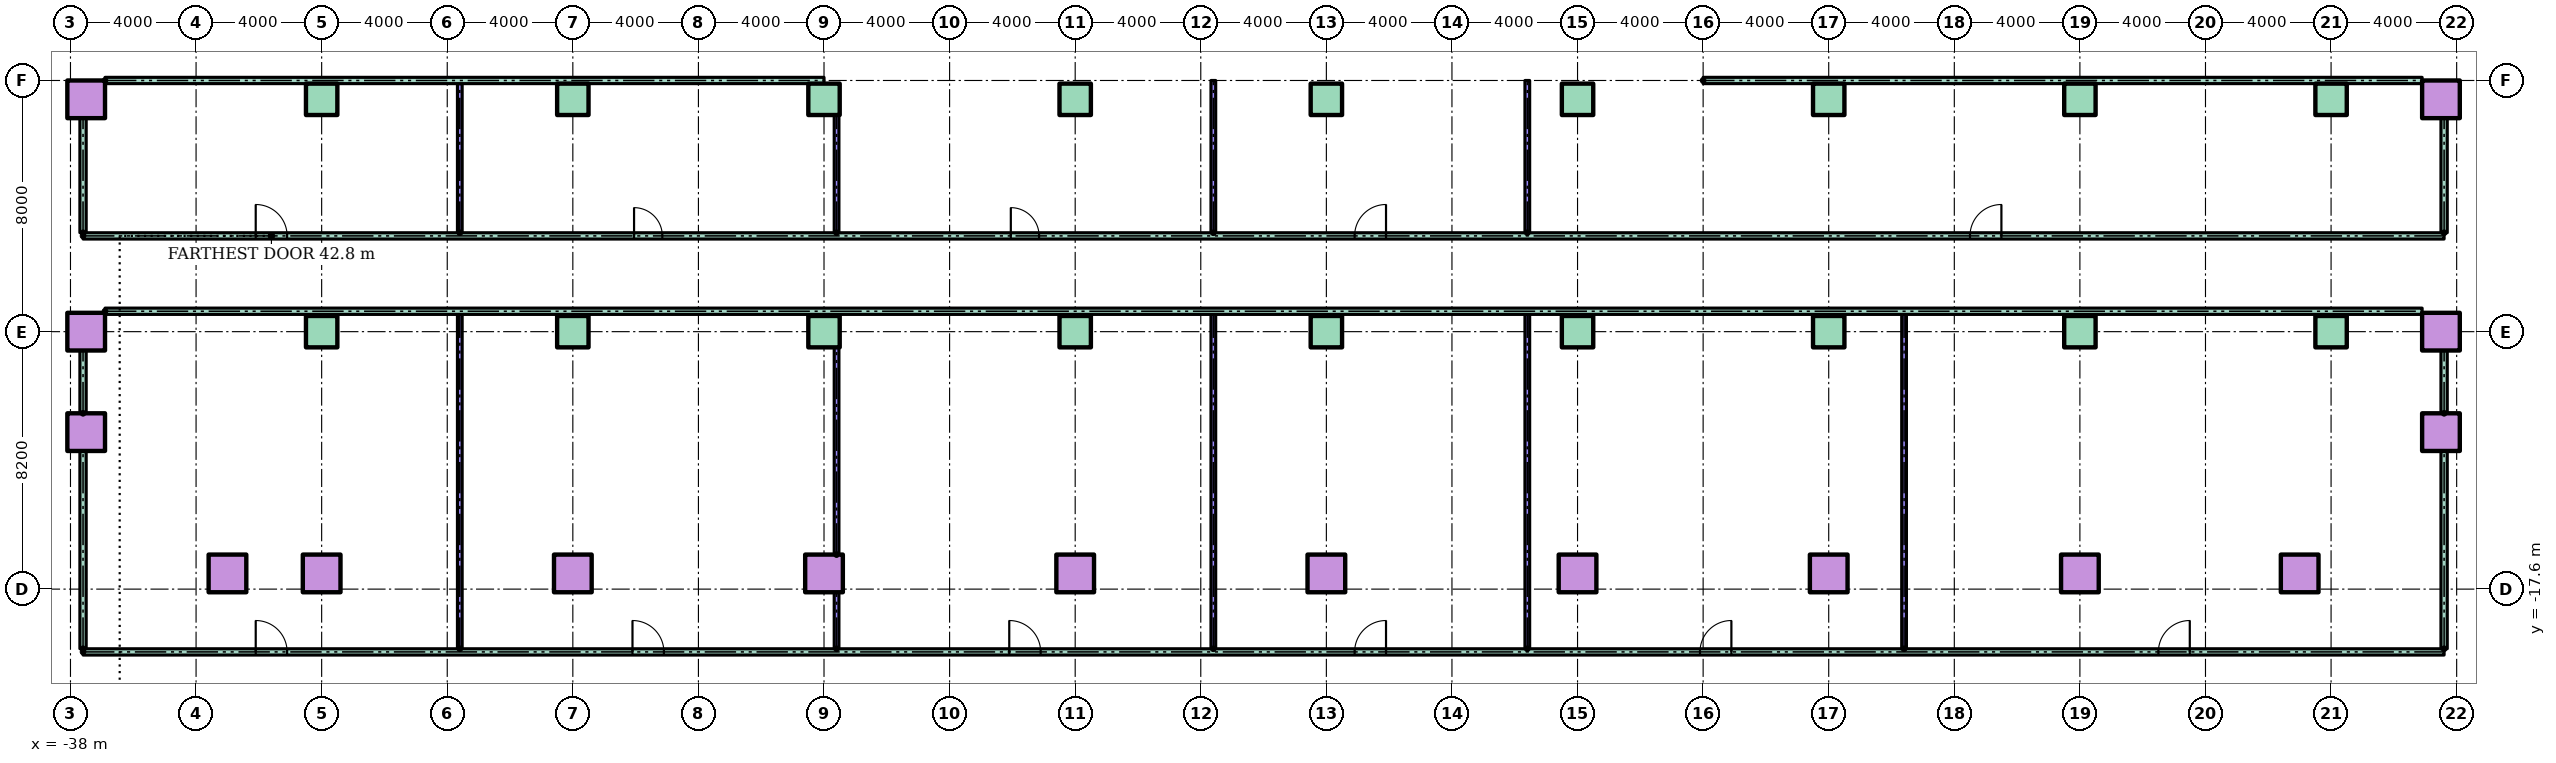
"""IFC4 building model, lengths in metres.
Left out: names, types, materials, properties, quantities, classifications, styles, units other than length and angle.
Written with IfcOpenShell. Run it as: python <this file> out.ifc"""

import sys

from ifc_helpers import new_model, si_unit, direction, frame, frame_2d, origin, origin_2d, place, context, subcontext, project, spatial, rectangle, hollow_rectangle, extrude, element, fill, save


model = new_model("IFC4")
c1 = context("Model", 3, precision=1e-05, world=origin(), true_north=direction((0.0, 1.0)))
c2 = subcontext(c1, "Body", "Model", "MODEL_VIEW")
j1 = project(units=[si_unit("LENGTHUNIT", "METRE"), si_unit("PLANEANGLEUNIT", "RADIAN")], contexts=[c1])
p1 = place(None, origin())
s1 = spatial("IfcSite", under=j1, at=p1, CompositionType="ELEMENT")
p2 = place(p1, origin())
s2 = spatial("IfcBuilding", under=s1, at=p2, CompositionType="ELEMENT")
p3 = place(p2, frame((0.0, 0.0, 22.0)))
s3 = spatial("IfcBuildingStorey", under=s2, at=p3, CompositionType="ELEMENT", Elevation=22.0)
for number, where in (
    (1, (-33.0, -17.1, 0.0)),
    (2, (-30.0, -17.1, 0.0)),
    (3, (-22.0, -17.1, 0.0)),
    (4, (-14.0, -17.1, 0.0)),
    (5, (-6.0, -17.1, 0.0)),
    (6, (2.0, -17.1, 0.0)),
    (7, (10.0, -17.1, 0.0)),
    (8, (18.0, -17.1, 0.0)),
    (9, (26.0, -17.1, 0.0)),
    (10, (33.0, -17.1, 0.0)),
    (11, (-37.5, -12.6, 0.0)),
    (12, (37.5, -12.6, 0.0)),
    (13, (-37.5, -9.4, 0.0)),
):
    element("IfcColumn", number, at=place(p3, frame(where)), inside=s3, PredefinedType="COLUMN", context=c2, shape_type="SweptSolid", body=[
        extrude(hollow_rectangle(XDim=1.2, YDim=1.2, WallThickness=0.06, at=origin_2d()), origin(), (0.0, 0.0, 1.0), 4.0),
    ])
for number, where in (
    (14, (-30.0, -9.4, 0.0)),
    (15, (-22.0, -9.4, 0.0)),
    (16, (-14.0, -9.4, 0.0)),
    (17, (-6.0, -9.4, 0.0)),
    (18, (2.0, -9.4, 0.0)),
    (19, (10.0, -9.4, 0.0)),
    (20, (18.0, -9.4, 0.0)),
    (21, (26.0, -9.4, 0.0)),
    (22, (34.0, -9.4, 0.0)),
):
    element("IfcColumn", number, at=place(p3, frame(where)), inside=s3, PredefinedType="COLUMN", context=c2, shape_type="SweptSolid", body=[
        extrude(rectangle(XDim=1.0, YDim=1.0, at=origin_2d()), origin(), (0.0, 0.0, 1.0), 4.0),
    ])
for number, where in (
    (23, (37.5, -9.4, 0.0)),
    (24, (-37.5, -2.0, 0.0)),
):
    element("IfcColumn", number, at=place(p3, frame(where)), inside=s3, PredefinedType="COLUMN", context=c2, shape_type="SweptSolid", body=[
        extrude(hollow_rectangle(XDim=1.2, YDim=1.2, WallThickness=0.06, at=origin_2d()), origin(), (0.0, 0.0, 1.0), 4.0),
    ])
for number, where in (
    (25, (-30.0, -2.0, 0.0)),
    (26, (-22.0, -2.0, 0.0)),
    (27, (-14.0, -2.0, 0.0)),
    (28, (-6.0, -2.0, 0.0)),
    (29, (2.0, -2.0, 0.0)),
    (30, (10.0, -2.0, 0.0)),
    (31, (18.0, -2.0, 0.0)),
    (32, (26.0, -2.0, 0.0)),
    (33, (34.0, -2.0, 0.0)),
):
    element("IfcColumn", number, at=place(p3, frame(where)), inside=s3, PredefinedType="COLUMN", context=c2, shape_type="SweptSolid", body=[
        extrude(rectangle(XDim=1.0, YDim=1.0, at=origin_2d()), origin(), (0.0, 0.0, 1.0), 4.0),
    ])
p4 = place(p3, frame((37.5, -2.0, 0.0)))
e34 = element("IfcColumn", 34, at=p4, inside=s3, PredefinedType="COLUMN", context=c2, shape_type="SweptSolid", body=[
    extrude(hollow_rectangle(XDim=1.2, YDim=1.2, WallThickness=0.06, at=origin_2d()), origin(), (0.0, 0.0, 1.0), 4.0),
])
p5 = place(p3, frame((-37.6, -19.6, 0.0)))
e35 = element("IfcWall", 35, at=p5, inside=s3, PredefinedType="PARTITIONING", context=c2, shape_type="SweptSolid", body=[
    extrude(rectangle(XDim=75.2, YDim=0.2, at=frame_2d((37.6, 0.0))), origin(), (0.0, 0.0, 1.0), 3.2),
])
p6 = place(p5, frame((5.5, 0.0, 0.0)))
e36 = element("IfcOpeningElement", 36, at=p6, cuts=e35, PredefinedType="OPENING", context=c2, shape_type="SweptSolid", body=[
    extrude(rectangle(XDim=1.0, YDim=2.1, at=frame_2d((0.5, 1.05))), frame((0.0, 0.11, 0.0), z_axis=(0.0, -1.0, 0.0), x_axis=(1.0, 0.0, 0.0)), (0.0, 0.0, 1.0), 0.22),
])
p7 = place(p5, frame((17.5, 0.0, 0.0)))
e37 = element("IfcOpeningElement", 37, at=p7, cuts=e35, PredefinedType="OPENING", context=c2, shape_type="SweptSolid", body=[
    extrude(rectangle(XDim=1.0, YDim=2.1, at=frame_2d((0.5, 1.05))), frame((0.0, 0.11, 0.0), z_axis=(0.0, -1.0, 0.0), x_axis=(1.0, 0.0, 0.0)), (0.0, 0.0, 1.0), 0.22),
])
p8 = place(p5, frame((29.5, 0.0, 0.0)))
e38 = element("IfcOpeningElement", 38, at=p8, cuts=e35, PredefinedType="OPENING", context=c2, shape_type="SweptSolid", body=[
    extrude(rectangle(XDim=1.0, YDim=2.1, at=frame_2d((0.5, 1.05))), frame((0.0, 0.11, 0.0), z_axis=(0.0, -1.0, 0.0), x_axis=(1.0, 0.0, 0.0)), (0.0, 0.0, 1.0), 0.22),
])
p9 = place(p5, frame((40.5, 0.0, 0.0)))
e39 = element("IfcOpeningElement", 39, at=p9, cuts=e35, PredefinedType="OPENING", context=c2, shape_type="SweptSolid", body=[
    extrude(rectangle(XDim=1.0, YDim=2.1, at=frame_2d((0.5, 1.05))), frame((0.0, 0.11, 0.0), z_axis=(0.0, -1.0, 0.0), x_axis=(1.0, 0.0, 0.0)), (0.0, 0.0, 1.0), 0.22),
])
p10 = place(p5, frame((51.5, 0.0, 0.0)))
e40 = element("IfcOpeningElement", 40, at=p10, cuts=e35, PredefinedType="OPENING", context=c2, shape_type="SweptSolid", body=[
    extrude(rectangle(XDim=1.0, YDim=2.1, at=frame_2d((0.5, 1.05))), frame((0.0, 0.11, 0.0), z_axis=(0.0, -1.0, 0.0), x_axis=(1.0, 0.0, 0.0)), (0.0, 0.0, 1.0), 0.22),
])
p11 = place(p5, frame((66.1, 0.0, 0.0)))
e41 = element("IfcOpeningElement", 41, at=p11, cuts=e35, PredefinedType="OPENING", context=c2, shape_type="SweptSolid", body=[
    extrude(rectangle(XDim=1.0, YDim=2.1, at=frame_2d((0.5, 1.05))), frame((0.0, 0.11, 0.0), z_axis=(0.0, -1.0, 0.0), x_axis=(1.0, 0.0, 0.0)), (0.0, 0.0, 1.0), 0.22),
])
p12 = place(p3, frame((-36.9, -8.75, 0.0)))
e42 = element("IfcWall", 42, at=p12, inside=s3, PredefinedType="PARTITIONING", context=c2, shape_type="SweptSolid", body=[
    extrude(rectangle(XDim=73.8, YDim=0.2, at=frame_2d((36.9, 0.0))), origin(), (0.0, 0.0, 1.0), 3.2),
])
p13 = place(p3, frame((-37.6, -6.35, 0.0)))
e43 = element("IfcWall", 43, at=p13, inside=s3, PredefinedType="PARTITIONING", context=c2, shape_type="SweptSolid", body=[
    extrude(rectangle(XDim=75.2, YDim=0.2, at=frame_2d((37.6, 0.0))), origin(), (0.0, 0.0, 1.0), 3.2),
])
p14 = place(p13, frame((5.5, 0.0, 0.0)))
e44 = element("IfcOpeningElement", 44, at=p14, cuts=e43, PredefinedType="OPENING", context=c2, shape_type="SweptSolid", body=[
    extrude(rectangle(XDim=1.0, YDim=2.1, at=frame_2d((0.5, 1.05))), frame((0.0, 0.11, 0.0), z_axis=(0.0, -1.0, 0.0), x_axis=(1.0, 0.0, 0.0)), (0.0, 0.0, 1.0), 0.22),
])
p15 = place(p13, frame((17.55, 0.0, 0.0)))
e45 = element("IfcOpeningElement", 45, at=p15, cuts=e43, PredefinedType="OPENING", context=c2, shape_type="SweptSolid", body=[
    extrude(rectangle(XDim=0.9, YDim=2.1, at=frame_2d((0.45, 1.05))), frame((0.0, 0.11, 0.0), z_axis=(0.0, -1.0, 0.0), x_axis=(1.0, 0.0, 0.0)), (0.0, 0.0, 1.0), 0.22),
])
p16 = place(p13, frame((29.55, 0.0, 0.0)))
e46 = element("IfcOpeningElement", 46, at=p16, cuts=e43, PredefinedType="OPENING", context=c2, shape_type="SweptSolid", body=[
    extrude(rectangle(XDim=0.9, YDim=2.1, at=frame_2d((0.45, 1.05))), frame((0.0, 0.11, 0.0), z_axis=(0.0, -1.0, 0.0), x_axis=(1.0, 0.0, 0.0)), (0.0, 0.0, 1.0), 0.22),
])
p17 = place(p13, frame((40.5, 0.0, 0.0)))
e47 = element("IfcOpeningElement", 47, at=p17, cuts=e43, PredefinedType="OPENING", context=c2, shape_type="SweptSolid", body=[
    extrude(rectangle(XDim=1.0, YDim=2.1, at=frame_2d((0.5, 1.05))), frame((0.0, 0.11, 0.0), z_axis=(0.0, -1.0, 0.0), x_axis=(1.0, 0.0, 0.0)), (0.0, 0.0, 1.0), 0.22),
])
p18 = place(p13, frame((60.1, 0.0, 0.0)))
e48 = element("IfcOpeningElement", 48, at=p18, cuts=e43, PredefinedType="OPENING", context=c2, shape_type="SweptSolid", body=[
    extrude(rectangle(XDim=1.0, YDim=2.1, at=frame_2d((0.5, 1.05))), frame((0.0, 0.11, 0.0), z_axis=(0.0, -1.0, 0.0), x_axis=(1.0, 0.0, 0.0)), (0.0, 0.0, 1.0), 0.22),
])
for number, where in (
    (49, (-36.9, -1.4, 0.0)),
    (50, (14.0, -1.4, 0.0)),
):
    element("IfcWall", number, at=place(p3, frame(where)), inside=s3, PredefinedType="PARTITIONING", context=c2, shape_type="SweptSolid", body=[
        extrude(rectangle(XDim=22.9, YDim=0.2, at=frame_2d((11.45, 0.0))), origin(), (0.0, 0.0, 1.0), 3.2),
    ])
p19 = place(p3, frame((-37.6, -19.5, 0.0), z_axis=(0.0, 0.0, 1.0), x_axis=(0.0, 1.0, 0.0)))
e51 = element("IfcWall", 51, at=p19, inside=s3, PredefinedType="PARTITIONING", context=c2, shape_type="SweptSolid", body=[
    extrude(rectangle(XDim=6.3, YDim=0.2, at=frame_2d((3.15, 0.0))), origin(), (0.0, 0.0, 1.0), 3.2),
])
p20 = place(p3, frame((-37.6, -12.0, 0.0), z_axis=(0.0, 0.0, 1.0), x_axis=(0.0, 1.0, 0.0)))
e52 = element("IfcWall", 52, at=p20, inside=s3, PredefinedType="PARTITIONING", context=c2, shape_type="SweptSolid", body=[
    extrude(rectangle(XDim=2.0, YDim=0.2, at=frame_2d((1.0, 0.0))), origin(), (0.0, 0.0, 1.0), 3.2),
])
p21 = place(p3, frame((-37.6, -6.25, 0.0), z_axis=(0.0, 0.0, 1.0), x_axis=(0.0, 1.0, 0.0)))
e53 = element("IfcWall", 53, at=p21, inside=s3, PredefinedType="PARTITIONING", context=c2, shape_type="SweptSolid", body=[
    extrude(rectangle(XDim=3.65, YDim=0.2, at=frame_2d((1.825, 0.0))), origin(), (0.0, 0.0, 1.0), 3.2),
])
p22 = place(p3, frame((-25.6, -19.5, 0.0), z_axis=(0.0, 0.0, 1.0), x_axis=(0.0, 1.0, 0.0)))
e54 = element("IfcWall", 54, at=p22, inside=s3, PredefinedType="PARTITIONING", context=c2, shape_type="SweptSolid", body=[
    extrude(rectangle(XDim=10.65, YDim=0.15, at=frame_2d((5.325, 0.0))), origin(), (0.0, 0.0, 1.0), 3.2),
])
p23 = place(p3, frame((-25.6, -6.25, 0.0), z_axis=(0.0, 0.0, 1.0), x_axis=(0.0, 1.0, 0.0)))
e55 = element("IfcWall", 55, at=p23, inside=s3, PredefinedType="PARTITIONING", context=c2, shape_type="SweptSolid", body=[
    extrude(rectangle(XDim=4.75, YDim=0.15, at=frame_2d((2.375, 0.0))), origin(), (0.0, 0.0, 1.0), 3.2),
])
p24 = place(p3, frame((-13.6, -19.5, 0.0), z_axis=(0.0, 0.0, 1.0), x_axis=(0.0, 1.0, 0.0)))
e56 = element("IfcWall", 56, at=p24, inside=s3, PredefinedType="PARTITIONING", context=c2, shape_type="SweptSolid", body=[
    extrude(rectangle(XDim=1.8, YDim=0.15, at=frame_2d((0.9, 0.0))), origin(), (0.0, 0.0, 1.0), 3.2),
])
p25 = place(p3, frame((-13.6, -16.5, 0.0), z_axis=(0.0, 0.0, 1.0), x_axis=(0.0, 1.0, 0.0)))
e57 = element("IfcWall", 57, at=p25, inside=s3, PredefinedType="PARTITIONING", context=c2, shape_type="SweptSolid", body=[
    extrude(rectangle(XDim=6.6, YDim=0.15, at=frame_2d((3.3, 0.0))), origin(), (0.0, 0.0, 1.0), 3.2),
])
p26 = place(p3, frame((-13.6, -6.25, 0.0), z_axis=(0.0, 0.0, 1.0), x_axis=(0.0, 1.0, 0.0)))
e58 = element("IfcWall", 58, at=p26, inside=s3, PredefinedType="PARTITIONING", context=c2, shape_type="SweptSolid", body=[
    extrude(rectangle(XDim=3.75, YDim=0.15, at=frame_2d((1.875, 0.0))), origin(), (0.0, 0.0, 1.0), 3.2),
])
p27 = place(p3, frame((-1.6, -19.5, 0.0), z_axis=(0.0, 0.0, 1.0), x_axis=(0.0, 1.0, 0.0)))
e59 = element("IfcWall", 59, at=p27, inside=s3, PredefinedType="PARTITIONING", context=c2, shape_type="SweptSolid", body=[
    extrude(rectangle(XDim=10.65, YDim=0.15, at=frame_2d((5.325, 0.0))), origin(), (0.0, 0.0, 1.0), 3.2),
])
p28 = place(p3, frame((-1.6, -6.25, 0.0), z_axis=(0.0, 0.0, 1.0), x_axis=(0.0, 1.0, 0.0)))
e60 = element("IfcWall", 60, at=p28, inside=s3, PredefinedType="PARTITIONING", context=c2, shape_type="SweptSolid", body=[
    extrude(rectangle(XDim=4.85, YDim=0.15, at=frame_2d((2.425, 0.0))), origin(), (0.0, 0.0, 1.0), 3.2),
])
p29 = place(p3, frame((8.4, -19.5, 0.0), z_axis=(0.0, 0.0, 1.0), x_axis=(0.0, 1.0, 0.0)))
e61 = element("IfcWall", 61, at=p29, inside=s3, PredefinedType="PARTITIONING", context=c2, shape_type="SweptSolid", body=[
    extrude(rectangle(XDim=10.65, YDim=0.15, at=frame_2d((5.325, 0.0))), origin(), (0.0, 0.0, 1.0), 3.2),
])
p30 = place(p3, frame((8.4, -6.25, 0.0), z_axis=(0.0, 0.0, 1.0), x_axis=(0.0, 1.0, 0.0)))
e62 = element("IfcWall", 62, at=p30, inside=s3, PredefinedType="PARTITIONING", context=c2, shape_type="SweptSolid", body=[
    extrude(rectangle(XDim=4.85, YDim=0.15, at=frame_2d((2.425, 0.0))), origin(), (0.0, 0.0, 1.0), 3.2),
])
p31 = place(p3, frame((20.4, -19.5, 0.0), z_axis=(0.0, 0.0, 1.0), x_axis=(0.0, 1.0, 0.0)))
e63 = element("IfcWall", 63, at=p31, inside=s3, PredefinedType="PARTITIONING", context=c2, shape_type="SweptSolid", body=[
    extrude(rectangle(XDim=10.65, YDim=0.15, at=frame_2d((5.325, 0.0))), origin(), (0.0, 0.0, 1.0), 3.2),
])
p32 = place(p3, frame((37.6, -19.5, 0.0), z_axis=(0.0, 0.0, 1.0), x_axis=(0.0, 1.0, 0.0)))
e64 = element("IfcWall", 64, at=p32, inside=s3, PredefinedType="PARTITIONING", context=c2, shape_type="SweptSolid", body=[
    extrude(rectangle(XDim=6.3, YDim=0.2, at=frame_2d((3.15, 0.0))), origin(), (0.0, 0.0, 1.0), 3.2),
])
p33 = place(p3, frame((37.6, -12.0, 0.0), z_axis=(0.0, 0.0, 1.0), x_axis=(0.0, 1.0, 0.0)))
e65 = element("IfcWall", 65, at=p33, inside=s3, PredefinedType="PARTITIONING", context=c2, shape_type="SweptSolid", body=[
    extrude(rectangle(XDim=2.0, YDim=0.2, at=frame_2d((1.0, 0.0))), origin(), (0.0, 0.0, 1.0), 3.2),
])
p34 = place(p3, frame((37.6, -6.25, 0.0), z_axis=(0.0, 0.0, 1.0), x_axis=(0.0, 1.0, 0.0)))
e66 = element("IfcWall", 66, at=p34, inside=s3, PredefinedType="PARTITIONING", context=c2, shape_type="SweptSolid", body=[
    extrude(rectangle(XDim=3.65, YDim=0.2, at=frame_2d((1.825, 0.0))), origin(), (0.0, 0.0, 1.0), 3.2),
])
p35 = place(p6, origin())
e67 = element("IfcDoor", 67, at=p35, inside=s3, OperationType="SINGLE_SWING_LEFT", PredefinedType="DOOR", context=c2, shape_type="SweptSolid", body=[
    extrude(rectangle(XDim=1.0, YDim=2.1, at=frame_2d((0.5, 1.05))), frame((0.0, 0.025, 0.0), z_axis=(0.0, -1.0, 0.0), x_axis=(1.0, 0.0, 0.0)), (0.0, 0.0, 1.0), 0.05),
])
fill(e36, e67)
p36 = place(p7, origin())
e68 = element("IfcDoor", 68, at=p36, inside=s3, OperationType="SINGLE_SWING_LEFT", PredefinedType="DOOR", context=c2, shape_type="SweptSolid", body=[
    extrude(rectangle(XDim=1.0, YDim=2.1, at=frame_2d((0.5, 1.05))), frame((0.0, 0.025, 0.0), z_axis=(0.0, -1.0, 0.0), x_axis=(1.0, 0.0, 0.0)), (0.0, 0.0, 1.0), 0.05),
])
fill(e37, e68)
p37 = place(p8, origin())
e69 = element("IfcDoor", 69, at=p37, inside=s3, OperationType="SINGLE_SWING_LEFT", PredefinedType="DOOR", context=c2, shape_type="SweptSolid", body=[
    extrude(rectangle(XDim=1.0, YDim=2.1, at=frame_2d((0.5, 1.05))), frame((0.0, 0.025, 0.0), z_axis=(0.0, -1.0, 0.0), x_axis=(1.0, 0.0, 0.0)), (0.0, 0.0, 1.0), 0.05),
])
fill(e38, e69)
p38 = place(p9, origin())
e70 = element("IfcDoor", 70, at=p38, inside=s3, OperationType="SINGLE_SWING_RIGHT", PredefinedType="DOOR", context=c2, shape_type="SweptSolid", body=[
    extrude(rectangle(XDim=1.0, YDim=2.1, at=frame_2d((0.5, 1.05))), frame((0.0, 0.025, 0.0), z_axis=(0.0, -1.0, 0.0), x_axis=(1.0, 0.0, 0.0)), (0.0, 0.0, 1.0), 0.05),
])
fill(e39, e70)
p39 = place(p10, origin())
e71 = element("IfcDoor", 71, at=p39, inside=s3, OperationType="SINGLE_SWING_RIGHT", PredefinedType="DOOR", context=c2, shape_type="SweptSolid", body=[
    extrude(rectangle(XDim=1.0, YDim=2.1, at=frame_2d((0.5, 1.05))), frame((0.0, 0.025, 0.0), z_axis=(0.0, -1.0, 0.0), x_axis=(1.0, 0.0, 0.0)), (0.0, 0.0, 1.0), 0.05),
])
fill(e40, e71)
p40 = place(p11, origin())
e72 = element("IfcDoor", 72, at=p40, inside=s3, OperationType="SINGLE_SWING_RIGHT", PredefinedType="DOOR", context=c2, shape_type="SweptSolid", body=[
    extrude(rectangle(XDim=1.0, YDim=2.1, at=frame_2d((0.5, 1.05))), frame((0.0, 0.025, 0.0), z_axis=(0.0, -1.0, 0.0), x_axis=(1.0, 0.0, 0.0)), (0.0, 0.0, 1.0), 0.05),
])
fill(e41, e72)
p41 = place(p14, origin())
e73 = element("IfcDoor", 73, at=p41, inside=s3, OperationType="SINGLE_SWING_LEFT", PredefinedType="DOOR", context=c2, shape_type="SweptSolid", body=[
    extrude(rectangle(XDim=1.0, YDim=2.1, at=frame_2d((0.5, 1.05))), frame((0.0, 0.025, 0.0), z_axis=(0.0, -1.0, 0.0), x_axis=(1.0, 0.0, 0.0)), (0.0, 0.0, 1.0), 0.05),
])
fill(e44, e73)
p42 = place(p15, origin())
e74 = element("IfcDoor", 74, at=p42, inside=s3, OperationType="SINGLE_SWING_LEFT", PredefinedType="DOOR", context=c2, shape_type="SweptSolid", body=[
    extrude(rectangle(XDim=0.9, YDim=2.1, at=frame_2d((0.45, 1.05))), frame((0.0, 0.025, 0.0), z_axis=(0.0, -1.0, 0.0), x_axis=(1.0, 0.0, 0.0)), (0.0, 0.0, 1.0), 0.05),
])
fill(e45, e74)
p43 = place(p16, origin())
e75 = element("IfcDoor", 75, at=p43, inside=s3, OperationType="SINGLE_SWING_LEFT", PredefinedType="DOOR", context=c2, shape_type="SweptSolid", body=[
    extrude(rectangle(XDim=0.9, YDim=2.1, at=frame_2d((0.45, 1.05))), frame((0.0, 0.025, 0.0), z_axis=(0.0, -1.0, 0.0), x_axis=(1.0, 0.0, 0.0)), (0.0, 0.0, 1.0), 0.05),
])
fill(e46, e75)
p44 = place(p17, origin())
e76 = element("IfcDoor", 76, at=p44, inside=s3, OperationType="SINGLE_SWING_RIGHT", PredefinedType="DOOR", context=c2, shape_type="SweptSolid", body=[
    extrude(rectangle(XDim=1.0, YDim=2.1, at=frame_2d((0.5, 1.05))), frame((0.0, 0.025, 0.0), z_axis=(0.0, -1.0, 0.0), x_axis=(1.0, 0.0, 0.0)), (0.0, 0.0, 1.0), 0.05),
])
fill(e47, e76)
p45 = place(p18, origin())
e77 = element("IfcDoor", 77, at=p45, inside=s3, OperationType="SINGLE_SWING_RIGHT", PredefinedType="DOOR", context=c2, shape_type="SweptSolid", body=[
    extrude(rectangle(XDim=1.0, YDim=2.1, at=frame_2d((0.5, 1.05))), frame((0.0, 0.025, 0.0), z_axis=(0.0, -1.0, 0.0), x_axis=(1.0, 0.0, 0.0)), (0.0, 0.0, 1.0), 0.05),
])
fill(e48, e77)
save(model, sys.argv[1])
